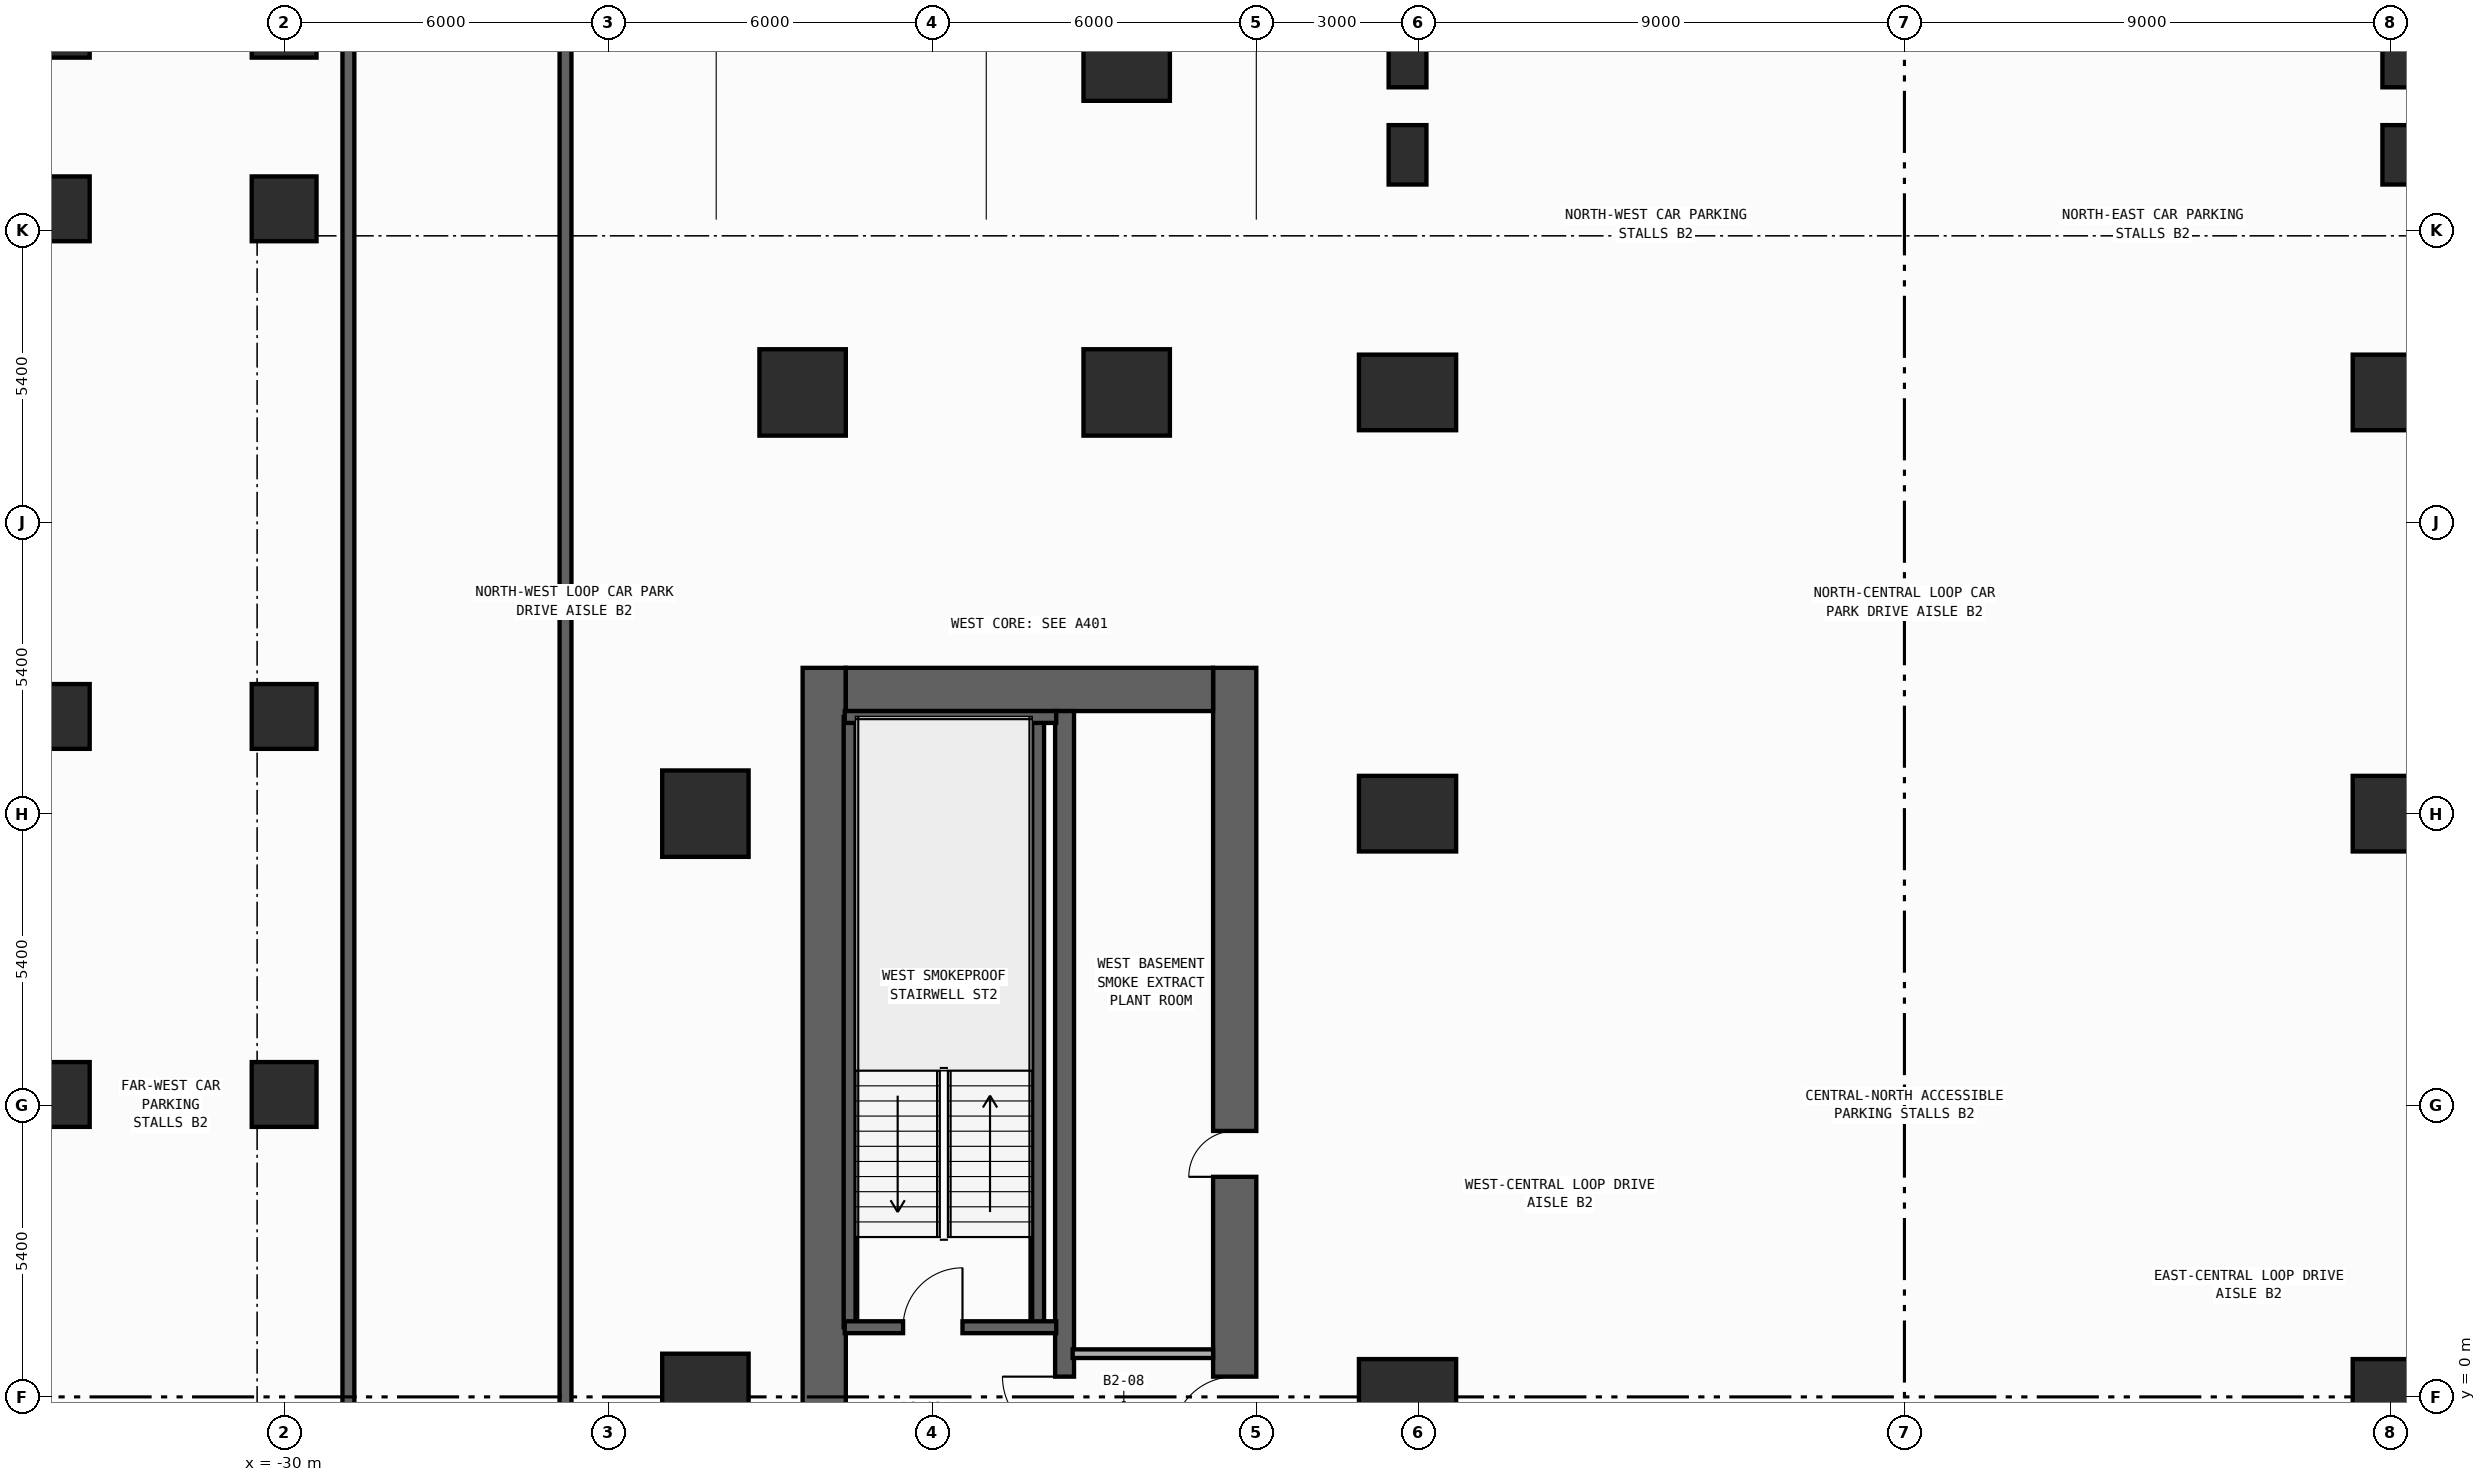
"""IFC4 building model, lengths in metres.
Left out: names, types, materials, properties, quantities, classifications, styles, units other than length and angle.
Written with IfcOpenShell. Run it as: python <this file> out.ifc"""

import sys

from ifc_helpers import new_model, si_unit, direction, frame, frame_2d, origin, origin_2d, place, context, subcontext, project, spatial, rectangle, extrude, element, fill, save


model = new_model("IFC4")
c1 = context("Model", 3, precision=1e-05, world=origin(), true_north=direction((0.0, 1.0)))
c2 = subcontext(c1, "Body", "Model", "MODEL_VIEW")
j1 = project(units=[si_unit("LENGTHUNIT", "METRE"), si_unit("PLANEANGLEUNIT", "RADIAN")], contexts=[c1])
p1 = place(None, origin())
s1 = spatial("IfcSite", under=j1, at=p1, CompositionType="ELEMENT")
p2 = place(p1, origin())
s2 = spatial("IfcBuilding", under=s1, at=p2, CompositionType="ELEMENT")
p3 = place(p2, frame((0.0, 0.0, -9.0)))
s3 = spatial("IfcBuildingStorey", under=s2, at=p3, CompositionType="ELEMENT", Elevation=-9.0)
p4 = place(p3, frame((-20.0, -13.5, 0.0), z_axis=(0.0, 0.0, 1.0), x_axis=(0.0, 1.0, 0.0)))
e1 = element("IfcWall", 1, at=p4, inside=s3, PredefinedType="SHEAR", context=c2, shape_type="SweptSolid", body=[
    extrude(rectangle(XDim=27.0, YDim=0.8, at=frame_2d((13.5, 0.0))), origin(), (0.0, 0.0, 1.0), 4.2),
])
p5 = place(p3, frame((-12.4, -13.5, 0.0), z_axis=(0.0, 0.0, 1.0), x_axis=(0.0, 1.0, 0.0)))
e2 = element("IfcWall", 2, at=p5, inside=s3, PredefinedType="SHEAR", context=c2, shape_type="SweptSolid", body=[
    extrude(rectangle(XDim=27.0, YDim=0.8, at=frame_2d((13.5, 0.0))), origin(), (0.0, 0.0, 1.0), 4.2),
])
p6 = place(p5, frame((17.575, 0.0, 0.0)))
e3 = element("IfcOpeningElement", 3, at=p6, cuts=e2, PredefinedType="OPENING", context=c2, shape_type="SweptSolid", body=[
    extrude(rectangle(XDim=0.85, YDim=2.1, at=frame_2d((0.425, 1.05))), frame((0.0, 0.41, 0.0), z_axis=(0.0, -1.0, 0.0), x_axis=(1.0, 0.0, 0.0)), (0.0, 0.0, 1.0), 0.82),
])
p7 = place(p5, frame((7.575, 0.0, 0.0)))
e4 = element("IfcOpeningElement", 4, at=p7, cuts=e2, PredefinedType="OPENING", context=c2, shape_type="SweptSolid", body=[
    extrude(rectangle(XDim=0.85, YDim=2.1, at=frame_2d((0.425, 1.05))), frame((0.0, 0.41, 0.0), z_axis=(0.0, -1.0, 0.0), x_axis=(1.0, 0.0, 0.0)), (0.0, 0.0, 1.0), 0.82),
])
p8 = place(p5, frame((12.725, 0.0, 0.0)))
e5 = element("IfcOpeningElement", 5, at=p8, cuts=e2, PredefinedType="OPENING", context=c2, shape_type="SweptSolid", body=[
    extrude(rectangle(XDim=1.15, YDim=2.2, at=frame_2d((0.575, 1.1))), frame((0.0, 0.41, 0.0), z_axis=(0.0, -1.0, 0.0), x_axis=(1.0, 0.0, 0.0)), (0.0, 0.0, 1.0), 0.82),
])
p9 = place(p5, frame((1.625, 0.0, 0.0)))
e6 = element("IfcOpeningElement", 6, at=p9, cuts=e2, PredefinedType="OPENING", context=c2, shape_type="SweptSolid", body=[
    extrude(rectangle(XDim=0.85, YDim=2.1, at=frame_2d((0.425, 1.05))), frame((0.0, 0.41, 0.0), z_axis=(0.0, -1.0, 0.0), x_axis=(1.0, 0.0, 0.0)), (0.0, 0.0, 1.0), 0.82),
])
p10 = place(p3, frame((-19.6, 13.1, 0.0), z_axis=(0.0, 0.0, 1.0), x_axis=(1.0, 0.0, 0.0)))
e7 = element("IfcWall", 7, at=p10, inside=s3, PredefinedType="SHEAR", context=c2, shape_type="SweptSolid", body=[
    extrude(rectangle(XDim=6.8, YDim=0.8, at=frame_2d((3.4, 0.0))), origin(), (0.0, 0.0, 1.0), 4.2),
])
p11 = place(p3, frame((-15.55, -12.7, 0.0), z_axis=(0.0, 0.0, 1.0), x_axis=(0.0, 1.0, 0.0)))
e8 = element("IfcWall", 8, at=p11, inside=s3, PredefinedType="SHEAR", context=c2, shape_type="SweptSolid", body=[
    extrude(rectangle(XDim=25.4, YDim=0.35, at=frame_2d((12.7, 0.0))), origin(), (0.0, 0.0, 1.0), 4.2),
])
p12 = place(p11, frame((11.925, 0.0, 0.0)))
e9 = element("IfcOpeningElement", 9, at=p12, cuts=e8, PredefinedType="OPENING", context=c2, shape_type="SweptSolid", body=[
    extrude(rectangle(XDim=1.15, YDim=2.2, at=frame_2d((0.575, 1.1))), frame((0.0, 0.185, 0.0), z_axis=(0.0, -1.0, 0.0), x_axis=(1.0, 0.0, 0.0)), (0.0, 0.0, 1.0), 0.37),
])
p13 = place(p11, frame((0.825, 0.0, 0.0)))
e10 = element("IfcOpeningElement", 10, at=p13, cuts=e8, PredefinedType="OPENING", context=c2, shape_type="SweptSolid", body=[
    extrude(rectangle(XDim=0.85, YDim=2.1, at=frame_2d((0.425, 1.05))), frame((0.0, 0.185, 0.0), z_axis=(0.0, -1.0, 0.0), x_axis=(1.0, 0.0, 0.0)), (0.0, 0.0, 1.0), 0.37),
])
for number, where, z_axis, x_axis in (
    (11, (-16.04, 1.29, 0.0), (0.0, 0.0, 1.0), (0.0, 1.0, 0.0)),
    (12, (-19.53, 1.29, 0.0), (0.0, 0.0, 1.0), (0.0, 1.0, 0.0)),
):
    element("IfcWall", number, at=place(p3, frame(where, z_axis=z_axis, x_axis=x_axis)), inside=s3, PredefinedType="SHEAR", context=c2, shape_type="SweptSolid", body=[
        extrude(rectangle(XDim=11.3, YDim=0.22, at=frame_2d((5.65, 0.0))), origin(), (0.0, 0.0, 1.0), 4.2),
    ])
p14 = place(p3, frame((-19.62, 12.59, 0.0), z_axis=(0.0, 0.0, 1.0), x_axis=(1.0, 0.0, 0.0)))
e13 = element("IfcWall", 13, at=p14, inside=s3, PredefinedType="SHEAR", context=c2, shape_type="SweptSolid", body=[
    extrude(rectangle(XDim=3.915, YDim=0.22, at=frame_2d((1.958, 0.0))), origin(), (0.0, 0.0, 1.0), 4.2),
])
p15 = place(p3, frame((-19.62, 1.29, 0.0), z_axis=(0.0, 0.0, 1.0), x_axis=(1.0, 0.0, 0.0)))
e14 = element("IfcWall", 14, at=p15, inside=s3, PredefinedType="SHEAR", context=c2, shape_type="SweptSolid", body=[
    extrude(rectangle(XDim=3.915, YDim=0.22, at=frame_2d((1.958, 0.0))), origin(), (0.0, 0.0, 1.0), 4.2),
])
p16 = place(p15, frame((1.08, 0.0, 0.0)))
e15 = element("IfcOpeningElement", 15, at=p16, cuts=e14, PredefinedType="OPENING", context=c2, shape_type="SweptSolid", body=[
    extrude(rectangle(XDim=1.1, YDim=2.2, at=frame_2d((0.55, 1.1))), frame((0.0, 0.12, 0.0), z_axis=(0.0, -1.0, 0.0), x_axis=(1.0, 0.0, 0.0)), (0.0, 0.0, 1.0), 0.24),
])
for number, where, z_axis, x_axis in (
    (16, (-9.2, 0.0, 0.0), (0.0, 0.0, 1.0), (1.0, 0.0, 0.0)),
    (17, (-9.2, 10.8, 0.0), (0.0, 0.0, 1.0), (1.0, 0.0, 0.0)),
    (18, (-9.2, 18.6, 0.0), (0.0, 0.0, 1.0), (1.0, 0.0, 0.0)),
    (19, (9.2, 0.0, 0.0), (0.0, 0.0, 1.0), (1.0, 0.0, 0.0)),
    (20, (9.2, 10.8, 0.0), (0.0, 0.0, 1.0), (1.0, 0.0, 0.0)),
    (21, (9.2, 18.6, 0.0), (0.0, 0.0, 1.0), (1.0, 0.0, 0.0)),
):
    element("IfcColumn", number, at=place(p3, frame(where, z_axis=z_axis, x_axis=x_axis)), inside=s3, PredefinedType="COLUMN", context=c2, shape_type="SweptSolid", body=[
        extrude(rectangle(XDim=1.8, YDim=1.4, at=origin_2d()), origin(), (0.0, 0.0, 1.0), 4.5),
    ])
for number, where, z_axis, x_axis in (
    (22, (-20.4, 18.6, 0.0), (0.0, 0.0, 1.0), (1.0, 0.0, 0.0)),
    (23, (-14.4, 18.6, 0.0), (0.0, 0.0, 1.0), (1.0, 0.0, 0.0)),
):
    element("IfcColumn", number, at=place(p3, frame(where, z_axis=z_axis, x_axis=x_axis)), inside=s3, PredefinedType="COLUMN", context=c2, shape_type="SweptSolid", body=[
        extrude(rectangle(XDim=1.6, YDim=1.6, at=origin_2d()), origin(), (0.0, 0.0, 1.0), 4.5),
    ])
for number, where, z_axis, x_axis in (
    (24, (-34.2, 5.6, 0.0), (0.0, 0.0, 1.0), (1.0, 0.0, 0.0)),
    (25, (-34.2, 12.6, 0.0), (0.0, 0.0, 1.0), (1.0, 0.0, 0.0)),
    (26, (-34.2, 22.0, 0.0), (0.0, 0.0, 1.0), (1.0, 0.0, 0.0)),
    (27, (-34.2, 25.4, 0.0), (0.0, 0.0, 1.0), (1.0, 0.0, 0.0)),
    (28, (-30.0, 5.6, 0.0), (0.0, 0.0, 1.0), (1.0, 0.0, 0.0)),
    (29, (-30.0, 12.6, 0.0), (0.0, 0.0, 1.0), (1.0, 0.0, 0.0)),
    (30, (-30.0, 22.0, 0.0), (0.0, 0.0, 1.0), (1.0, 0.0, 0.0)),
    (31, (-30.0, 25.4, 0.0), (0.0, 0.0, 1.0), (1.0, 0.0, 0.0)),
):
    element("IfcColumn", number, at=place(p3, frame(where, z_axis=z_axis, x_axis=x_axis)), inside=s3, PredefinedType="COLUMN", context=c2, shape_type="SweptSolid", body=[
        extrude(rectangle(XDim=1.2, YDim=1.2, at=origin_2d()), origin(), (0.0, 0.0, 1.0), 4.5),
    ])
for number, where, z_axis, x_axis in (
    (32, (-9.2, 24.8, 0.0), (0.0, 0.0, 1.0), (1.0, 0.0, 0.0)),
    (33, (9.2, 24.8, 0.0), (0.0, 0.0, 1.0), (1.0, 0.0, 0.0)),
):
    element("IfcColumn", number, at=place(p3, frame(where, z_axis=z_axis, x_axis=x_axis)), inside=s3, PredefinedType="PILASTER", context=c2, shape_type="SweptSolid", body=[
        extrude(rectangle(XDim=0.7, YDim=1.1, at=origin_2d()), origin(), (0.0, 0.0, 1.0), 4.5),
    ])
for number, where, z_axis, x_axis in (
    (34, (-22.2, 0.0, 0.0), (0.0, 0.0, 1.0), (1.0, 0.0, 0.0)),
    (35, (-22.2, 10.8, 0.0), (0.0, 0.0, 1.0), (1.0, 0.0, 0.0)),
    (36, (-14.4, 24.8, 0.0), (0.0, 0.0, 1.0), (1.0, 0.0, 0.0)),
):
    element("IfcColumn", number, at=place(p3, frame(where, z_axis=z_axis, x_axis=x_axis)), inside=s3, PredefinedType="COLUMN", context=c2, shape_type="SweptSolid", body=[
        extrude(rectangle(XDim=1.6, YDim=1.6, at=origin_2d()), origin(), (0.0, 0.0, 1.0), 4.5),
    ])
for number, where, z_axis, x_axis in (
    (37, (-9.2, 23.0, 0.0), (0.0, 0.0, 1.0), (1.0, 0.0, 0.0)),
    (38, (9.2, 23.0, 0.0), (0.0, 0.0, 1.0), (1.0, 0.0, 0.0)),
):
    element("IfcColumn", number, at=place(p3, frame(where, z_axis=z_axis, x_axis=x_axis)), inside=s3, PredefinedType="PILASTER", context=c2, shape_type="SweptSolid", body=[
        extrude(rectangle(XDim=0.7, YDim=1.1, at=origin_2d()), origin(), (0.0, 0.0, 1.0), 4.5),
    ])
for number, where, z_axis, x_axis in (
    (39, (-28.81, -3.8, 0.0), (0.0, 0.0, 1.0), (0.0, 1.0, 0.0)),
    (40, (-24.79, -3.8, 0.0), (0.0, 0.0, 1.0), (0.0, 1.0, 0.0)),
):
    element("IfcWall", number, at=place(p3, frame(where, z_axis=z_axis, x_axis=x_axis)), inside=s3, PredefinedType="SHEAR", context=c2, shape_type="SweptSolid", body=[
        extrude(rectangle(XDim=29.66, YDim=0.22, at=frame_2d((14.83, 0.0))), origin(), (0.0, 0.0, 1.0), 4.2),
    ])
p17 = place(p3, frame((-15.4, 0.8, 0.0), z_axis=(0.0, 0.0, 1.0), x_axis=(1.0, 0.0, 0.0)))
e41 = element("IfcWall", 41, at=p17, inside=s3, PredefinedType="STANDARD", context=c2, shape_type="SweptSolid", body=[
    extrude(rectangle(XDim=2.6, YDim=0.16, at=frame_2d((1.3, 0.0))), origin(), (0.0, 0.0, 1.0), 4.2),
])
p18 = place(p16, origin())
e42 = element("IfcDoor", 42, at=p18, inside=s3, OperationType="SINGLE_SWING_RIGHT", PredefinedType="DOOR", context=c2, shape_type="SweptSolid", body=[
    extrude(rectangle(XDim=1.1, YDim=2.2, at=frame_2d((0.55, 1.1))), frame((0.0, 0.025, 0.0), z_axis=(0.0, -1.0, 0.0), x_axis=(1.0, 0.0, 0.0)), (0.0, 0.0, 1.0), 0.05),
])
fill(e15, e42)
p19 = place(p6, origin())
e43 = element("IfcDoor", 43, at=p19, inside=s3, OperationType="SINGLE_SWING_LEFT", PredefinedType="DOOR", context=c2, shape_type="SweptSolid", body=[
    extrude(rectangle(XDim=0.85, YDim=2.1, at=frame_2d((0.425, 1.05))), frame((0.0, 0.025, 0.0), z_axis=(0.0, -1.0, 0.0), x_axis=(1.0, 0.0, 0.0)), (0.0, 0.0, 1.0), 0.05),
])
fill(e3, e43)
p20 = place(p8, origin())
e44 = element("IfcDoor", 44, at=p20, inside=s3, OperationType="SINGLE_SWING_LEFT", PredefinedType="DOOR", context=c2, shape_type="SweptSolid", body=[
    extrude(rectangle(XDim=1.15, YDim=2.2, at=frame_2d((0.575, 1.1))), frame((0.0, 0.025, 0.0), z_axis=(0.0, -1.0, 0.0), x_axis=(1.0, 0.0, 0.0)), (0.0, 0.0, 1.0), 0.05),
])
fill(e5, e44)
p21 = place(p12, origin())
e45 = element("IfcDoor", 45, at=p21, inside=s3, OperationType="SINGLE_SWING_RIGHT", PredefinedType="DOOR", context=c2, shape_type="SweptSolid", body=[
    extrude(rectangle(XDim=1.15, YDim=2.2, at=frame_2d((0.575, 1.1))), frame((0.0, 0.025, 0.0), z_axis=(0.0, -1.0, 0.0), x_axis=(1.0, 0.0, 0.0)), (0.0, 0.0, 1.0), 0.05),
])
fill(e9, e45)
save(model, sys.argv[1])
